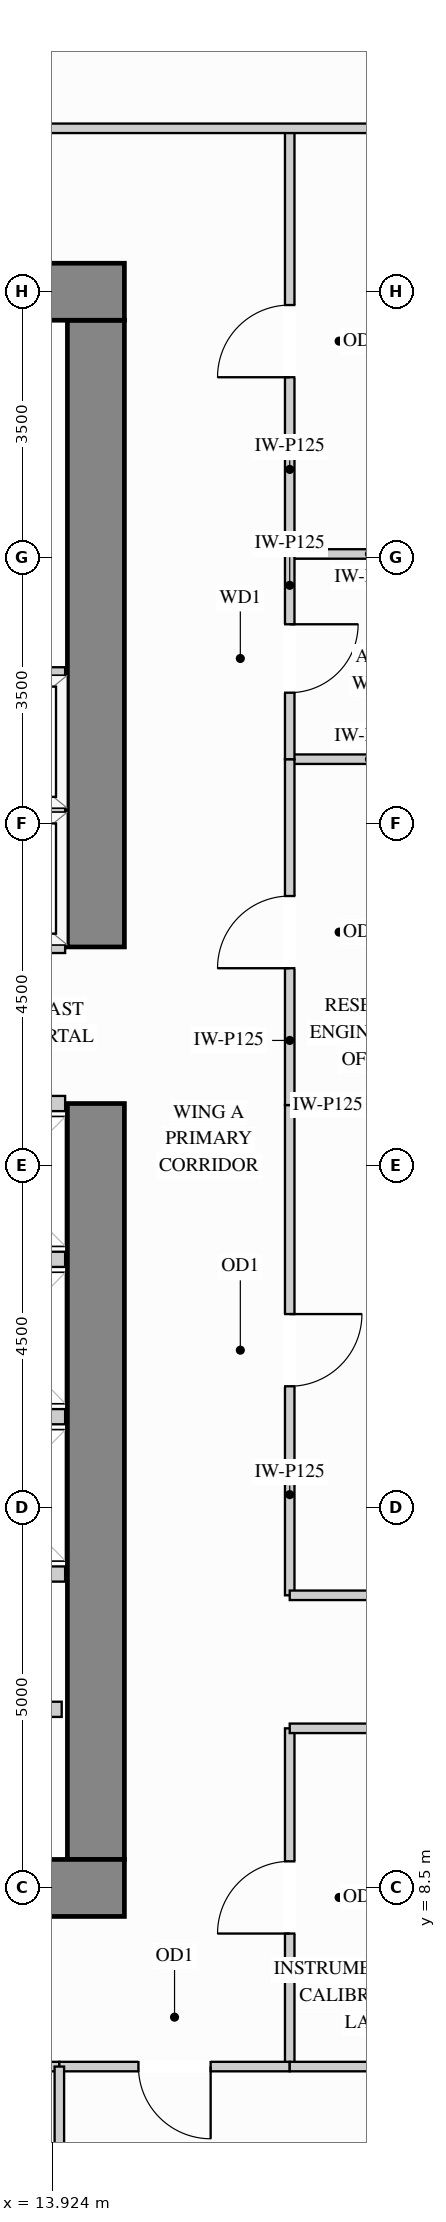
"""IFC4 building model, lengths in metres.
Left out: names, types, materials, properties, quantities, classifications, styles, units other than length and angle.
Written with IfcOpenShell. Run it as: python <this file> out.ifc"""

import sys

from ifc_helpers import new_model, si_unit, direction, frame, frame_2d, origin, place, context, subcontext, project, spatial, rectangle, extrude, source, transform, mapped, element, fill, save


model = new_model("IFC4")
c1 = context("Model", 3, precision=1e-05, world=origin(), true_north=direction((0.0, 1.0)))
c2 = subcontext(c1, "Body", "Model", "MODEL_VIEW")
j1 = project(units=[si_unit("LENGTHUNIT", "METRE"), si_unit("PLANEANGLEUNIT", "RADIAN")], contexts=[c1])
p1 = place(None, origin())
s1 = spatial("IfcSite", under=j1, at=p1, CompositionType="ELEMENT")
p2 = place(p1, origin())
s2 = spatial("IfcBuilding", under=s1, at=p2, CompositionType="ELEMENT")
p3 = place(p2, frame((0.0, 0.0, 95.4)))
s3 = spatial("IfcBuildingStorey", under=s2, at=p3, CompositionType="ELEMENT", Elevation=95.4)
m1 = source(origin(), c2, "Body", "SweptSolid", [
    extrude(rectangle(XDim=9.945, YDim=0.75, at=frame_2d((4.973, 0.0))), origin(), (0.0, 0.0, 1.0), 3.38),
])
p4 = place(p3, frame((14.5, 8.875, 0.0), z_axis=(0.0, 0.0, 1.0), x_axis=(0.0, 1.0, 0.0)))
e1 = element("IfcWall", 1, at=p4, inside=s3, PredefinedType="SHEAR", context=c2, shape_type="MappedRepresentation", body=[
    mapped(m1, transform((0.0, 0.0, 0.0), x_axis=(1.0, 0.0, 0.0), y_axis=(0.0, 1.0, 0.0), z_axis=(0.0, 0.0, 1.0))),
])
m2 = source(origin(), c2, "Body", "SweptSolid", [
    extrude(rectangle(XDim=8.245, YDim=0.75, at=frame_2d((4.123, 0.0))), origin(), (0.0, 0.0, 1.0), 3.38),
])
p5 = place(p3, frame((14.5, 20.88, 0.0), z_axis=(0.0, 0.0, 1.0), x_axis=(0.0, 1.0, 0.0)))
e2 = element("IfcWall", 2, at=p5, inside=s3, PredefinedType="SHEAR", context=c2, shape_type="MappedRepresentation", body=[
    mapped(m2, transform((0.0, 0.0, 0.0), x_axis=(1.0, 0.0, 0.0), y_axis=(0.0, 1.0, 0.0), z_axis=(0.0, 0.0, 1.0))),
])
m3 = source(origin(), c2, "Body", "SweptSolid", [
    extrude(rectangle(XDim=10.75, YDim=0.75, at=frame_2d((5.375, 0.0))), origin(), (0.0, 0.0, 1.0), 3.38),
])
for number, where, z_axis, x_axis in (
    (3, (4.125, 29.5, 0.0), (0.0, 0.0, 1.0), (1.0, 0.0, 0.0)),
    (4, (4.125, 8.5, 0.0), (0.0, 0.0, 1.0), (1.0, 0.0, 0.0)),
):
    element("IfcWall", number, at=place(p3, frame(where, z_axis=z_axis, x_axis=x_axis)), inside=s3, PredefinedType="SHEAR", context=c2, shape_type="MappedRepresentation", body=[
        mapped(m3, transform((0.0, 0.0, 0.0), x_axis=(1.0, 0.0, 0.0), y_axis=(0.0, 1.0, 0.0), z_axis=(0.0, 0.0, 1.0))),
    ])
m4 = source(origin(), c2, "Body", "SweptSolid", [
    extrude(rectangle(XDim=2.1, YDim=0.125, at=frame_2d((1.05, 0.0))), origin(), (0.0, 0.0, 1.0), 3.365),
])
p6 = place(p3, frame((17.05, 18.8, 0.0), z_axis=(0.0, 0.0, 1.0), x_axis=(1.0, 0.0, 0.0)))
e5 = element("IfcWall", 5, at=p6, inside=s3, PredefinedType="PARTITIONING", context=c2, shape_type="MappedRepresentation", body=[
    mapped(m4, transform((0.0, 0.0, 0.0), x_axis=(1.0, 0.0, 0.0), y_axis=(0.0, 1.0, 0.0), z_axis=(0.0, 0.0, 1.0))),
])
m5 = source(origin(), c2, "Body", "SweptSolid", [
    extrude(rectangle(XDim=2.098, YDim=0.125, at=frame_2d((1.049, 0.0))), origin(), (0.0, 0.0, 1.0), 3.365),
])
for number, where, z_axis, x_axis in (
    (6, (17.05, 23.35, 0.0), (0.0, 0.0, 1.0), (1.0, 0.0, 0.0)),
    (7, (17.05, 26.05, 0.0), (0.0, 0.0, 1.0), (1.0, 0.0, 0.0)),
):
    element("IfcWall", number, at=place(p3, frame(where, z_axis=z_axis, x_axis=x_axis)), inside=s3, PredefinedType="PARTITIONING", context=c2, shape_type="MappedRepresentation", body=[
        mapped(m5, transform((0.0, 0.0, 0.0), x_axis=(1.0, 0.0, 0.0), y_axis=(0.0, 1.0, 0.0), z_axis=(0.0, 0.0, 1.0))),
    ])
p7 = place(p3, frame((17.05, 12.35, 0.0), z_axis=(0.0, 0.0, 1.0), x_axis=(0.0, 1.0, 0.0)))
e8 = element("IfcWall", 8, at=p7, inside=s3, PredefinedType="PARTITIONING", context=c2, shape_type="SweptSolid", body=[
    extrude(rectangle(XDim=6.45, YDim=0.125, at=frame_2d((3.225, 0.0))), origin(), (0.0, 0.0, 1.0), 3.365),
])
p8 = place(p7, frame((2.75, 0.0, 0.0)))
e9 = element("IfcOpeningElement", 9, at=p8, cuts=e8, PredefinedType="OPENING", context=c2, shape_type="SweptSolid", body=[
    extrude(rectangle(XDim=0.95, YDim=2.15, at=frame_2d((0.475, 1.075))), frame((0.0, 0.073, 0.0), z_axis=(0.0, -1.0, 0.0), x_axis=(1.0, 0.0, 0.0)), (0.0, 0.0, 1.0), 0.145),
])
p9 = place(p3, frame((17.05, 18.8, 0.0), z_axis=(0.0, 0.0, 1.0), x_axis=(0.0, 1.0, 0.0)))
e10 = element("IfcWall", 10, at=p9, inside=s3, PredefinedType="PARTITIONING", context=c2, shape_type="SweptSolid", body=[
    extrude(rectangle(XDim=4.55, YDim=0.125, at=frame_2d((2.275, 0.0))), origin(), (0.0, 0.0, 1.0), 3.365),
])
p10 = place(p9, frame((1.8, 0.0, 0.0)))
e11 = element("IfcOpeningElement", 11, at=p10, cuts=e10, PredefinedType="OPENING", context=c2, shape_type="SweptSolid", body=[
    extrude(rectangle(XDim=0.95, YDim=2.15, at=frame_2d((0.475, 1.075))), frame((0.0, 0.073, 0.0), z_axis=(0.0, -1.0, 0.0), x_axis=(1.0, 0.0, 0.0)), (0.0, 0.0, 1.0), 0.145),
])
p11 = place(p3, frame((17.05, 26.05, 0.0), z_axis=(0.0, 0.0, 1.0), x_axis=(0.0, 1.0, 0.0)))
e12 = element("IfcWall", 12, at=p11, inside=s3, PredefinedType="PARTITIONING", context=c2, shape_type="SweptSolid", body=[
    extrude(rectangle(XDim=5.6, YDim=0.125, at=frame_2d((2.8, 0.0))), origin(), (0.0, 0.0, 1.0), 3.365),
])
p12 = place(p11, frame((2.325, 0.0, 0.0)))
e13 = element("IfcOpeningElement", 13, at=p12, cuts=e12, PredefinedType="OPENING", context=c2, shape_type="SweptSolid", body=[
    extrude(rectangle(XDim=0.95, YDim=2.15, at=frame_2d((0.475, 1.075))), frame((0.0, 0.073, 0.0), z_axis=(0.0, -1.0, 0.0), x_axis=(1.0, 0.0, 0.0)), (0.0, 0.0, 1.0), 0.145),
])
p13 = place(p3, frame((17.05, 6.15, 0.0), z_axis=(0.0, 0.0, 1.0), x_axis=(0.0, 1.0, 0.0)))
e14 = element("IfcWall", 14, at=p13, inside=s3, PredefinedType="PARTITIONING", context=c2, shape_type="SweptSolid", body=[
    extrude(rectangle(XDim=4.45, YDim=0.125, at=frame_2d((2.225, 0.0))), origin(), (0.0, 0.0, 1.0), 3.365),
])
p14 = place(p13, frame((1.75, 0.0, 0.0)))
e15 = element("IfcOpeningElement", 15, at=p14, cuts=e14, PredefinedType="OPENING", context=c2, shape_type="SweptSolid", body=[
    extrude(rectangle(XDim=0.95, YDim=2.15, at=frame_2d((0.475, 1.075))), frame((0.0, 0.073, 0.0), z_axis=(0.0, -1.0, 0.0), x_axis=(1.0, 0.0, 0.0)), (0.0, 0.0, 1.0), 0.145),
])
p15 = place(p3, frame((17.05, 23.35, 0.0), z_axis=(0.0, 0.0, 1.0), x_axis=(0.0, 1.0, 0.0)))
e16 = element("IfcWall", 16, at=p15, inside=s3, PredefinedType="PARTITIONING", context=c2, shape_type="SweptSolid", body=[
    extrude(rectangle(XDim=2.7, YDim=0.125, at=frame_2d((1.35, 0.0))), origin(), (0.0, 0.0, 1.0), 3.365),
])
p16 = place(p15, frame((0.875, 0.0, 0.0)))
e17 = element("IfcOpeningElement", 17, at=p16, cuts=e16, PredefinedType="OPENING", context=c2, shape_type="SweptSolid", body=[
    extrude(rectangle(XDim=0.9, YDim=2.15, at=frame_2d((0.45, 1.075))), frame((0.0, 0.073, 0.0), z_axis=(0.0, -1.0, 0.0), x_axis=(1.0, 0.0, 0.0)), (0.0, 0.0, 1.0), 0.145),
])
m6 = source(origin(), c2, "Body", "SweptSolid", [
    extrude(rectangle(XDim=12.598, YDim=0.125, at=frame_2d((6.299, 0.0))), origin(), (0.0, 0.0, 1.0), 2.828),
])
p17 = place(p3, frame((6.55, 31.65, 0.0), z_axis=(0.0, 0.0, 1.0), x_axis=(1.0, 0.0, 0.0)))
e18 = element("IfcWall", 18, at=p17, inside=s3, PredefinedType="PARTITIONING", context=c2, shape_type="MappedRepresentation", body=[
    mapped(m6, transform((0.0, 0.0, 0.0), x_axis=(1.0, 0.0, 0.0), y_axis=(0.0, 1.0, 0.0), z_axis=(0.0, 0.0, 1.0))),
])
m7 = source(origin(), c2, "Body", "SweptSolid", [
    extrude(rectangle(XDim=2.45, YDim=0.125, at=frame_2d((1.225, 0.0))), origin(), (0.0, 0.0, 1.0), 3.365),
])
for number, where, z_axis, x_axis in (
    (19, (17.05, 12.35, 0.0), (0.0, 0.0, 1.0), (1.0, 0.0, 0.0)),
    (20, (17.05, 10.6, 0.0), (0.0, 0.0, 1.0), (1.0, 0.0, 0.0)),
):
    element("IfcWall", number, at=place(p3, frame(where, z_axis=z_axis, x_axis=x_axis)), inside=s3, PredefinedType="PARTITIONING", context=c2, shape_type="MappedRepresentation", body=[
        mapped(m7, transform((0.0, 0.0, 0.0), x_axis=(1.0, 0.0, 0.0), y_axis=(0.0, 1.0, 0.0), z_axis=(0.0, 0.0, 1.0))),
    ])
p18 = place(p3, frame((8.392, 6.15, 0.0), z_axis=(0.0, 0.0, 1.0), x_axis=(1.0, 0.0, 0.0)))
e21 = element("IfcWall", 21, at=p18, inside=s3, PredefinedType="PARTITIONING", context=c2, shape_type="SweptSolid", body=[
    extrude(rectangle(XDim=5.627, YDim=0.125, at=frame_2d((2.813, 0.0))), origin(), (0.0, 0.0, 1.0), 3.365),
])
p19 = place(p18, frame((2.338, 0.0, 0.0)))
e22 = element("IfcOpeningElement", 22, at=p19, cuts=e21, PredefinedType="OPENING", context=c2, shape_type="SweptSolid", body=[
    extrude(rectangle(XDim=0.95, YDim=2.15, at=frame_2d((0.475, 1.075))), frame((0.0, 0.073, 0.0), z_axis=(0.0, -1.0, 0.0), x_axis=(1.0, 0.0, 0.0)), (0.0, 0.0, 1.0), 0.145),
])
p20 = place(p3, frame((14.019, 6.15, 0.0), z_axis=(0.0, 0.0, 1.0), x_axis=(1.0, 0.0, 0.0)))
e23 = element("IfcWall", 23, at=p20, inside=s3, PredefinedType="PARTITIONING", context=c2, shape_type="SweptSolid", body=[
    extrude(rectangle(XDim=3.031, YDim=0.125, at=frame_2d((1.516, 0.0))), origin(), (0.0, 0.0, 1.0), 3.365),
])
p21 = place(p20, frame((1.041, 0.0, 0.0)))
e24 = element("IfcOpeningElement", 24, at=p21, cuts=e23, PredefinedType="OPENING", context=c2, shape_type="SweptSolid", body=[
    extrude(rectangle(XDim=0.95, YDim=2.15, at=frame_2d((0.475, 1.075))), frame((0.0, 0.073, 0.0), z_axis=(0.0, -1.0, 0.0), x_axis=(1.0, 0.0, 0.0)), (0.0, 0.0, 1.0), 0.145),
])
p22 = place(p3, frame((17.05, 6.15, 0.0), z_axis=(0.0, 0.0, 1.0), x_axis=(1.0, 0.0, 0.0)))
e25 = element("IfcWall", 25, at=p22, inside=s3, PredefinedType="PARTITIONING", context=c2, shape_type="MappedRepresentation", body=[
    mapped(m5, transform((0.0, 0.0, 0.0), x_axis=(1.0, 0.0, 0.0), y_axis=(0.0, 1.0, 0.0), z_axis=(0.0, 0.0, 1.0))),
])
m8 = source(origin(), c2, "Body", "SweptSolid", [
    extrude(rectangle(XDim=4.96, YDim=0.125, at=frame_2d((2.48, 0.0))), origin(), (0.0, 0.0, 1.0), 3.365),
])
p23 = place(p3, frame((14.019, 1.19, 0.0), z_axis=(0.0, 0.0, 1.0), x_axis=(0.0, 1.0, 0.0)))
e26 = element("IfcWall", 26, at=p23, inside=s3, PredefinedType="PARTITIONING", context=c2, shape_type="MappedRepresentation", body=[
    mapped(m8, transform((0.0, 0.0, 0.0), x_axis=(1.0, 0.0, 0.0), y_axis=(0.0, 1.0, 0.0), z_axis=(0.0, 0.0, 1.0))),
])
m9 = source(origin(), c2, "Body", "SweptSolid", [
    extrude(rectangle(XDim=1.63, YDim=0.2, at=frame_2d((0.815, 0.0))), origin(), (0.0, 0.0, 1.0), 3.365),
])
p24 = place(p3, frame((12.42, 10.85, 0.0), z_axis=(0.0, 0.0, 1.0), x_axis=(1.0, 0.0, 0.0)))
e27 = element("IfcWall", 27, at=p24, inside=s3, PredefinedType="PARTITIONING", context=c2, shape_type="MappedRepresentation", body=[
    mapped(m9, transform((0.0, 0.0, 0.0), x_axis=(1.0, 0.0, 0.0), y_axis=(0.0, 1.0, 0.0), z_axis=(0.0, 0.0, 1.0))),
])
m10 = source(origin(), c2, "Body", "SweptSolid", [
    extrude(rectangle(XDim=2.265, YDim=0.2, at=frame_2d((1.132, 0.0))), origin(), (0.0, 0.0, 1.0), 3.365),
])
for number, where, z_axis, x_axis in (
    (28, (11.83, 22.66, 0.0), (0.0, 0.0, 1.0), (1.0, 0.0, 0.0)),
    (29, (11.83, 20.9, 0.0), (0.0, 0.0, 1.0), (1.0, 0.0, 0.0)),
    (30, (11.83, 24.46, 0.0), (0.0, 0.0, 1.0), (1.0, 0.0, 0.0)),
):
    element("IfcWall", number, at=place(p3, frame(where, z_axis=z_axis, x_axis=x_axis)), inside=s3, PredefinedType="PARTITIONING", context=c2, shape_type="MappedRepresentation", body=[
        mapped(m10, transform((0.0, 0.0, 0.0), x_axis=(1.0, 0.0, 0.0), y_axis=(0.0, 1.0, 0.0), z_axis=(0.0, 0.0, 1.0))),
    ])
m11 = source(origin(), c2, "Body", "SweptSolid", [
    extrude(rectangle(XDim=1.865, YDim=0.2, at=frame_2d((0.933, 0.0))), origin(), (0.0, 0.0, 1.0), 3.365),
])
for number, where, z_axis, x_axis in (
    (31, (12.23, 14.7, 0.0), (0.0, 0.0, 1.0), (1.0, 0.0, 0.0)),
    (32, (12.23, 12.63, 0.0), (0.0, 0.0, 1.0), (1.0, 0.0, 0.0)),
    (33, (12.23, 16.77, 0.0), (0.0, 0.0, 1.0), (1.0, 0.0, 0.0)),
    (34, (12.23, 18.82, 0.0), (0.0, 0.0, 1.0), (1.0, 0.0, 0.0)),
):
    element("IfcWall", number, at=place(p3, frame(where, z_axis=z_axis, x_axis=x_axis)), inside=s3, PredefinedType="PARTITIONING", context=c2, shape_type="MappedRepresentation", body=[
        mapped(m11, transform((0.0, 0.0, 0.0), x_axis=(1.0, 0.0, 0.0), y_axis=(0.0, 1.0, 0.0), z_axis=(0.0, 0.0, 1.0))),
    ])
m12 = source(origin(), c2, "Body", "SweptSolid", [
    extrude(rectangle(XDim=0.95, YDim=2.15, at=frame_2d((0.475, 1.075))), frame((0.0, 0.025, 0.0), z_axis=(0.0, -1.0, 0.0), x_axis=(1.0, 0.0, 0.0)), (0.0, 0.0, 1.0), 0.05),
])
p25 = place(p14, origin())
e35 = element("IfcDoor", 35, at=p25, inside=s3, OperationType="SINGLE_SWING_LEFT", PredefinedType="DOOR", context=c2, shape_type="MappedRepresentation", body=[
    mapped(m12, transform((0.0, 0.0, 0.0), x_axis=(1.0, 0.0, 0.0), y_axis=(0.0, 1.0, 0.0), z_axis=(0.0, 0.0, 1.0))),
])
fill(e15, e35)
p26 = place(p8, origin())
e36 = element("IfcDoor", 36, at=p26, inside=s3, OperationType="SINGLE_SWING_RIGHT", PredefinedType="DOOR", context=c2, shape_type="MappedRepresentation", body=[
    mapped(m12, transform((0.0, 0.0, 0.0), x_axis=(1.0, 0.0, 0.0), y_axis=(0.0, 1.0, 0.0), z_axis=(0.0, 0.0, 1.0))),
])
fill(e9, e36)
p27 = place(p10, origin())
e37 = element("IfcDoor", 37, at=p27, inside=s3, OperationType="SINGLE_SWING_LEFT", PredefinedType="DOOR", context=c2, shape_type="MappedRepresentation", body=[
    mapped(m12, transform((0.0, 0.0, 0.0), x_axis=(1.0, 0.0, 0.0), y_axis=(0.0, 1.0, 0.0), z_axis=(0.0, 0.0, 1.0))),
])
fill(e11, e37)
p28 = place(p12, origin())
e38 = element("IfcDoor", 38, at=p28, inside=s3, OperationType="SINGLE_SWING_LEFT", PredefinedType="DOOR", context=c2, shape_type="MappedRepresentation", body=[
    mapped(m12, transform((0.0, 0.0, 0.0), x_axis=(1.0, 0.0, 0.0), y_axis=(0.0, 1.0, 0.0), z_axis=(0.0, 0.0, 1.0))),
])
fill(e13, e38)
p29 = place(p21, origin())
e39 = element("IfcDoor", 39, at=p29, inside=s3, OperationType="SINGLE_SWING_RIGHT", PredefinedType="DOOR", context=c2, shape_type="MappedRepresentation", body=[
    mapped(m12, transform((0.0, 0.0, 0.0), x_axis=(1.0, 0.0, 0.0), y_axis=(0.0, 1.0, 0.0), z_axis=(0.0, 0.0, 1.0))),
])
fill(e24, e39)
m13 = source(origin(), c2, "Body", "SweptSolid", [
    extrude(rectangle(XDim=0.9, YDim=2.15, at=frame_2d((0.45, 1.075))), frame((0.0, 0.025, 0.0), z_axis=(0.0, -1.0, 0.0), x_axis=(1.0, 0.0, 0.0)), (0.0, 0.0, 1.0), 0.05),
])
p30 = place(p16, origin())
e40 = element("IfcDoor", 40, at=p30, inside=s3, OperationType="SINGLE_SWING_RIGHT", PredefinedType="DOOR", context=c2, shape_type="MappedRepresentation", body=[
    mapped(m13, transform((0.0, 0.0, 0.0), x_axis=(1.0, 0.0, 0.0), y_axis=(0.0, 1.0, 0.0), z_axis=(0.0, 0.0, 1.0))),
])
fill(e17, e40)
save(model, sys.argv[1])
